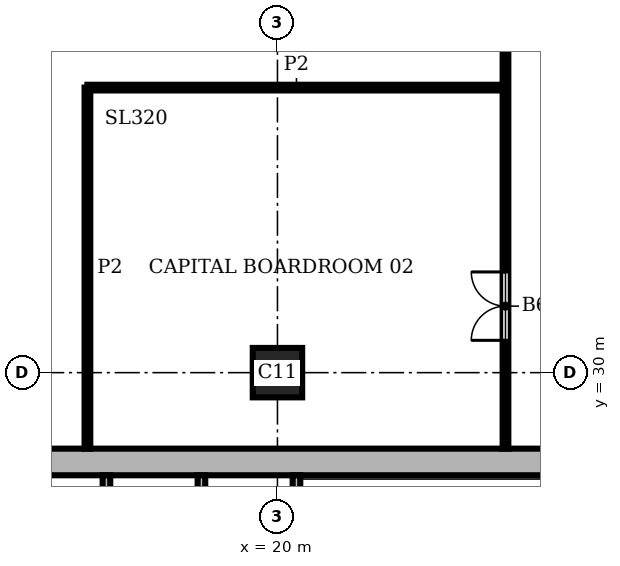
"""IFC4 building model, lengths in metres.
Left out: names, types, materials, properties, quantities, classifications, styles, units other than length and angle.
Written with IfcOpenShell. Run it as: python <this file> out.ifc"""

import sys

from ifc_helpers import new_model, si_unit, direction, frame, frame_2d, origin, origin_2d, place, context, subcontext, project, spatial, rectangle, extrude, element, fill, save


model = new_model("IFC4")
c1 = context("Model", 3, precision=1e-05, world=origin(), true_north=direction((0.0, 1.0)))
c2 = subcontext(c1, "Body", "Model", "MODEL_VIEW")
j1 = project(units=[si_unit("LENGTHUNIT", "METRE"), si_unit("PLANEANGLEUNIT", "RADIAN")], contexts=[c1])
p1 = place(None, origin())
s1 = spatial("IfcSite", under=j1, at=p1, CompositionType="ELEMENT")
p2 = place(p1, origin())
s2 = spatial("IfcBuilding", under=s1, at=p2, CompositionType="ELEMENT")
p3 = place(p2, frame((0.0, 0.0, 190.2)))
s3 = spatial("IfcBuildingStorey", under=s2, at=p3, CompositionType="ELEMENT", Elevation=190.2)
p4 = place(p3, frame((20.0, 30.0, 0.0), z_axis=(0.0, 0.0, 1.0), x_axis=(1.0, 0.0, 0.0)))
e1 = element("IfcColumn", 1, at=p4, inside=s3, PredefinedType="COLUMN", context=c2, shape_type="SweptSolid", body=[
    extrude(rectangle(XDim=1.3, YDim=1.3, at=origin_2d()), origin(), (0.0, 0.0, 1.0), 3.9),
])
p5 = place(p3, frame((28.0, 27.65, 0.0), z_axis=(0.0, 0.0, 1.0), x_axis=(-1.0, 0.0, 0.0)))
e2 = element("IfcWall", 2, at=p5, inside=s3, PredefinedType="SHEAR", context=c2, shape_type="SweptSolid", body=[
    extrude(rectangle(XDim=20.0, YDim=0.7, at=frame_2d((10.0, 0.0))), origin(), (0.0, 0.0, 1.0), 3.9),
])
p6 = place(p3, frame((15.5, 23.6, 0.0), z_axis=(0.0, 0.0, 1.0), x_axis=(0.0, 1.0, 0.0)))
e3 = element("IfcWall", 3, at=p6, inside=s3, PredefinedType="SHEAR", context=c2, shape_type="SweptSolid", body=[
    extrude(rectangle(XDim=3.7, YDim=0.2, at=frame_2d((1.85, 0.0))), origin(), (0.0, 0.0, 1.0), 3.58),
])
p7 = place(p3, frame((18.0, 20.0, 0.0), z_axis=(0.0, 0.0, 1.0), x_axis=(0.0, 1.0, 0.0)))
e4 = element("IfcWall", 4, at=p7, inside=s3, PredefinedType="SHEAR", context=c2, shape_type="SweptSolid", body=[
    extrude(rectangle(XDim=7.3, YDim=0.2, at=frame_2d((3.65, 0.0))), origin(), (0.0, 0.0, 1.0), 3.58),
])
p8 = place(p7, frame((1.2, 0.0, 0.0)))
e5 = element("IfcOpeningElement", 5, at=p8, cuts=e4, PredefinedType="OPENING", context=c2, shape_type="SweptSolid", body=[
    extrude(rectangle(XDim=1.2, YDim=2.1, at=frame_2d((0.6, 1.05))), frame((0.0, 0.11, 0.0), z_axis=(0.0, -1.0, 0.0), x_axis=(1.0, 0.0, 0.0)), (0.0, 0.0, 1.0), 0.22),
])
p9 = place(p3, frame((20.5, 23.6, 0.0), z_axis=(0.0, 0.0, 1.0), x_axis=(0.0, 1.0, 0.0)))
e6 = element("IfcWall", 6, at=p9, inside=s3, PredefinedType="SHEAR", context=c2, shape_type="SweptSolid", body=[
    extrude(rectangle(XDim=3.7, YDim=0.2, at=frame_2d((1.85, 0.0))), origin(), (0.0, 0.0, 1.0), 3.58),
])
p10 = place(p3, frame((15.0, 28.0, 0.0), z_axis=(0.0, 0.0, 1.0), x_axis=(0.0, 1.0, 0.0)))
e7 = element("IfcWall", 7, at=p10, inside=s3, PredefinedType="PARTITIONING", context=c2, shape_type="SweptSolid", body=[
    extrude(rectangle(XDim=9.5, YDim=0.15, at=frame_2d((4.75, 0.0))), origin(), (0.0, 0.0, 1.0), 3.58),
])
p11 = place(p3, frame((26.0, 28.0, 0.0), z_axis=(0.0, 0.0, 1.0), x_axis=(0.0, 1.0, 0.0)))
e8 = element("IfcWall", 8, at=p11, inside=s3, PredefinedType="PARTITIONING", context=c2, shape_type="SweptSolid", body=[
    extrude(rectangle(XDim=29.6, YDim=0.15, at=frame_2d((14.8, 0.0))), origin(), (0.0, 0.0, 1.0), 3.58),
])
p12 = place(p11, frame((2.85, 0.0, 0.0)))
e9 = element("IfcOpeningElement", 9, at=p12, cuts=e8, PredefinedType="OPENING", context=c2, shape_type="SweptSolid", body=[
    extrude(rectangle(XDim=1.8, YDim=2.1, at=frame_2d((0.9, 1.05))), frame((0.0, 0.085, 0.0), z_axis=(0.0, -1.0, 0.0), x_axis=(1.0, 0.0, 0.0)), (0.0, 0.0, 1.0), 0.17),
])
p13 = place(p11, frame((12.6, 0.0, 0.0)))
e10 = element("IfcOpeningElement", 10, at=p13, cuts=e8, PredefinedType="OPENING", context=c2, shape_type="SweptSolid", body=[
    extrude(rectangle(XDim=1.8, YDim=2.1, at=frame_2d((0.9, 1.05))), frame((0.0, 0.085, 0.0), z_axis=(0.0, -1.0, 0.0), x_axis=(1.0, 0.0, 0.0)), (0.0, 0.0, 1.0), 0.17),
])
p14 = place(p11, frame((21.6, 0.0, 0.0)))
e11 = element("IfcOpeningElement", 11, at=p14, cuts=e8, PredefinedType="OPENING", context=c2, shape_type="SweptSolid", body=[
    extrude(rectangle(XDim=1.0, YDim=2.1, at=frame_2d((0.5, 1.05))), frame((0.0, 0.085, 0.0), z_axis=(0.0, -1.0, 0.0), x_axis=(1.0, 0.0, 0.0)), (0.0, 0.0, 1.0), 0.17),
])
p15 = place(p3, frame((15.0, 37.5, 0.0), z_axis=(0.0, 0.0, 1.0), x_axis=(1.0, 0.0, 0.0)))
e12 = element("IfcWall", 12, at=p15, inside=s3, PredefinedType="PARTITIONING", context=c2, shape_type="SweptSolid", body=[
    extrude(rectangle(XDim=11.0, YDim=0.15, at=frame_2d((5.5, 0.0))), origin(), (0.0, 0.0, 1.0), 3.58),
])
p16 = place(p12, origin())
e13 = element("IfcDoor", 13, at=p16, inside=s3, OperationType="DOUBLE_DOOR_SINGLE_SWING", PredefinedType="DOOR", context=c2, shape_type="SweptSolid", body=[
    extrude(rectangle(XDim=1.8, YDim=2.1, at=frame_2d((0.9, 1.05))), frame((0.0, 0.025, 0.0), z_axis=(0.0, -1.0, 0.0), x_axis=(1.0, 0.0, 0.0)), (0.0, 0.0, 1.0), 0.05),
])
fill(e9, e13)
save(model, sys.argv[1])
